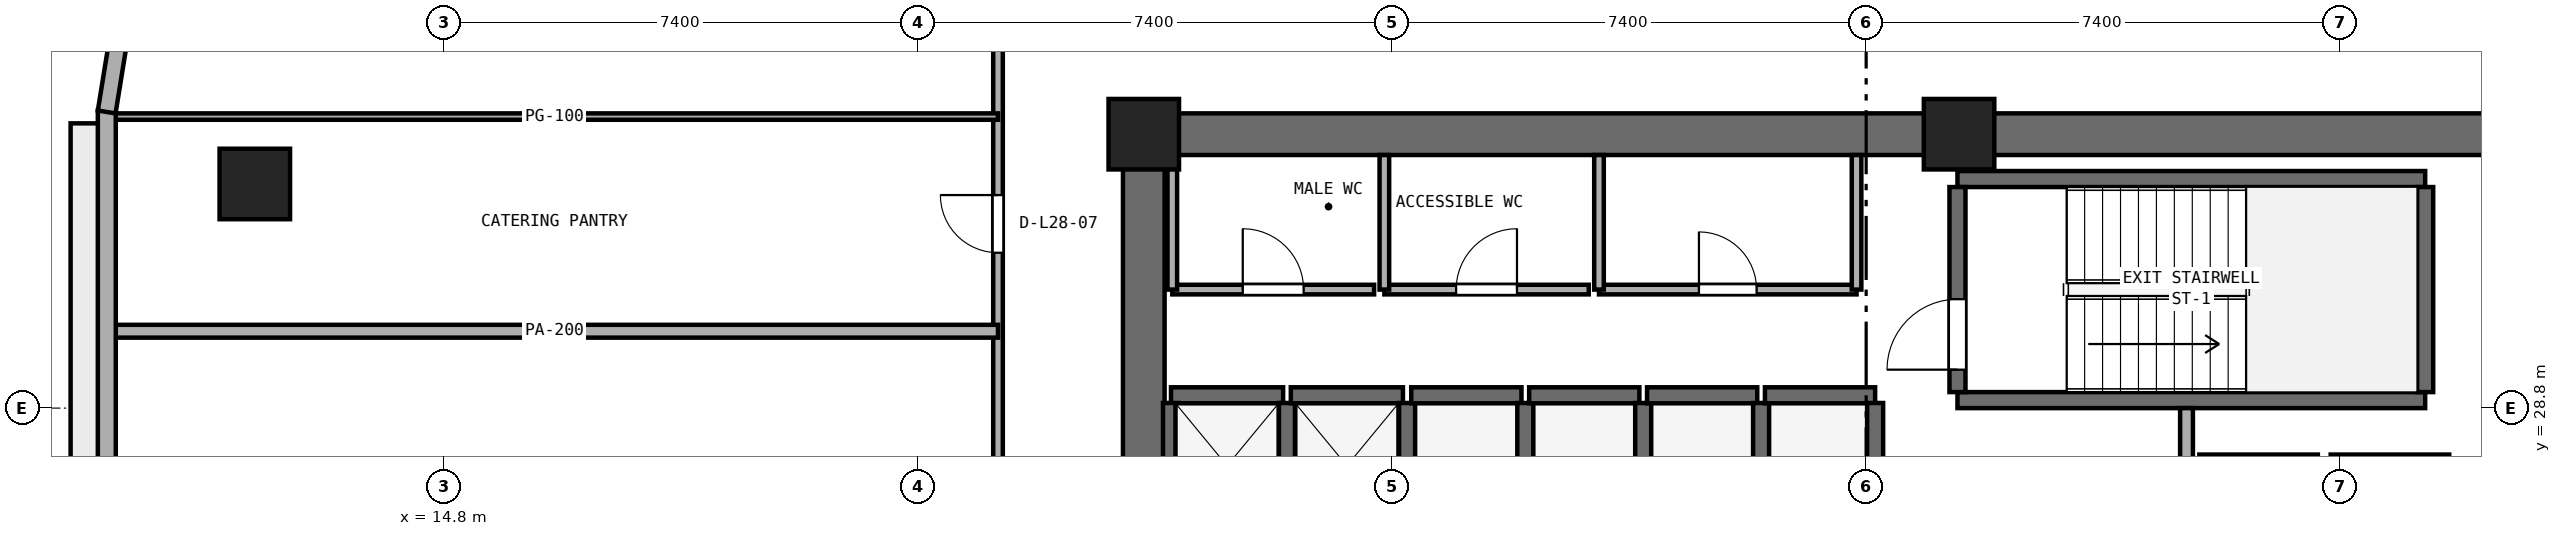
"""IFC4 building model, lengths in metres.
Left out: names, types, materials, properties, quantities, classifications, styles, units other than length and angle.
Written with IfcOpenShell. Run it as: python <this file> out.ifc"""

import sys

from ifc_helpers import new_model, si_unit, direction, frame, frame_2d, origin, origin_2d, place, context, subcontext, project, spatial, rectangle, extrude, element, fill, save


model = new_model("IFC4")
c1 = context("Model", 3, precision=1e-05, world=origin(), true_north=direction((0.0, 1.0)))
c2 = subcontext(c1, "Body", "Model", "MODEL_VIEW")
j1 = project(units=[si_unit("LENGTHUNIT", "METRE"), si_unit("PLANEANGLEUNIT", "RADIAN")], contexts=[c1])
p1 = place(None, origin())
s1 = spatial("IfcSite", under=j1, at=p1, CompositionType="ELEMENT")
p2 = place(p1, origin())
s2 = spatial("IfcBuilding", under=s1, at=p2, CompositionType="ELEMENT")
p3 = place(p2, frame((0.0, 0.0, 112.4)))
s3 = spatial("IfcBuildingStorey", under=s2, at=p3, CompositionType="ELEMENT", Elevation=112.4)
p4 = place(p3, frame((25.4, 33.075, 0.0), z_axis=(0.0, 0.0, 1.0), x_axis=(1.0, 0.0, 0.0)))
e1 = element("IfcWall", 1, at=p4, inside=s3, PredefinedType="SHEAR", context=c2, shape_type="SweptSolid", body=[
    extrude(rectangle(XDim=23.2, YDim=0.65, at=frame_2d((11.6, 0.0))), origin(), (0.0, 0.0, 1.0), 3.525),
])
p5 = place(p3, frame((25.725, 17.65, 0.0), z_axis=(0.0, 0.0, 1.0), x_axis=(0.0, 1.0, 0.0)))
e2 = element("IfcWall", 2, at=p5, inside=s3, PredefinedType="SHEAR", context=c2, shape_type="SweptSolid", body=[
    extrude(rectangle(XDim=15.1, YDim=0.65, at=frame_2d((7.55, 0.0))), origin(), (0.0, 0.0, 1.0), 3.525),
])
p6 = place(p5, frame((6.8, 0.0, 0.0)))
e3 = element("IfcOpeningElement", 3, at=p6, cuts=e2, PredefinedType="OPENING", context=c2, shape_type="SweptSolid", body=[
    extrude(rectangle(XDim=1.5, YDim=2.15, at=frame_2d((0.75, 1.075))), frame((0.0, 0.335, 0.0), z_axis=(0.0, -1.0, 0.0), x_axis=(1.0, 0.0, 0.0)), (0.0, 0.0, 1.0), 0.67),
])
for number, where, z_axis, x_axis in (
    (4, (38.45, 33.075, 0.0), (0.0, 0.0, 1.0), (1.0, 0.0, 0.0)),
    (5, (25.725, 33.075, 0.0), (0.0, 0.0, 1.0), (1.0, 0.0, 0.0)),
):
    element("IfcColumn", number, at=place(p3, frame(where, z_axis=z_axis, x_axis=x_axis)), inside=s3, PredefinedType="PILASTER", context=c2, shape_type="SweptSolid", body=[
        extrude(rectangle(XDim=1.1, YDim=1.1, at=origin_2d()), origin(), (0.0, 0.0, 1.0), 3.8),
    ])
p7 = place(p3, frame((11.85, 32.298, 0.0), z_axis=(0.0, 0.0, 1.0), x_axis=(1.0, 0.0, 0.0)))
e6 = element("IfcColumn", 6, at=p7, inside=s3, PredefinedType="COLUMN", context=c2, shape_type="SweptSolid", body=[
    extrude(rectangle(XDim=1.1, YDim=1.1, at=origin_2d()), origin(), (0.0, 0.0, 1.0), 3.8),
])
for number, where, z_axis, x_axis in (
    (7, (38.425, 28.925, 0.0), (0.0, 0.0, 1.0), (1.0, 0.0, 0.0)),
    (8, (38.425, 32.375, 0.0), (0.0, 0.0, 1.0), (1.0, 0.0, 0.0)),
):
    element("IfcWall", number, at=place(p3, frame(where, z_axis=z_axis, x_axis=x_axis)), inside=s3, PredefinedType="SHEAR", context=c2, shape_type="SweptSolid", body=[
        extrude(rectangle(XDim=7.3, YDim=0.25, at=frame_2d((3.65, 0.0))), origin(), (0.0, 0.0, 1.0), 3.525),
    ])
p8 = place(p3, frame((38.425, 29.05, 0.0), z_axis=(0.0, 0.0, 1.0), x_axis=(0.0, 1.0, 0.0)))
e9 = element("IfcWall", 9, at=p8, inside=s3, PredefinedType="SHEAR", context=c2, shape_type="SweptSolid", body=[
    extrude(rectangle(XDim=3.2, YDim=0.25, at=frame_2d((1.6, 0.0))), origin(), (0.0, 0.0, 1.0), 3.525),
])
p9 = place(p8, frame((0.35, 0.0, 0.0)))
e10 = element("IfcOpeningElement", 10, at=p9, cuts=e9, PredefinedType="OPENING", context=c2, shape_type="SweptSolid", body=[
    extrude(rectangle(XDim=1.1, YDim=2.15, at=frame_2d((0.55, 1.075))), frame((0.0, 0.135, 0.0), z_axis=(0.0, -1.0, 0.0), x_axis=(1.0, 0.0, 0.0)), (0.0, 0.0, 1.0), 0.27),
])
p10 = place(p3, frame((45.725, 29.05, 0.0), z_axis=(0.0, 0.0, 1.0), x_axis=(0.0, 1.0, 0.0)))
e11 = element("IfcWall", 11, at=p10, inside=s3, PredefinedType="SHEAR", context=c2, shape_type="SweptSolid", body=[
    extrude(rectangle(XDim=3.2, YDim=0.25, at=frame_2d((1.6, 0.0))), origin(), (0.0, 0.0, 1.0), 3.525),
])
p11 = place(p3, frame((26.15, 29.0, 0.0), z_axis=(0.0, 0.0, 1.0), x_axis=(1.0, 0.0, 0.0)))
e12 = element("IfcWall", 12, at=p11, inside=s3, PredefinedType="SHEAR", context=c2, shape_type="SweptSolid", body=[
    extrude(rectangle(XDim=1.75, YDim=0.25, at=frame_2d((0.875, 0.0))), origin(), (0.0, 0.0, 1.0), 3.525),
])
for number, where, z_axis, x_axis in (
    (13, (26.15, 26.92, 0.0), (0.0, 0.0, 1.0), (0.0, 1.0, 0.0)),
    (14, (27.96, 26.92, 0.0), (0.0, 0.0, 1.0), (0.0, 1.0, 0.0)),
):
    element("IfcWall", number, at=place(p3, frame(where, z_axis=z_axis, x_axis=x_axis)), inside=s3, PredefinedType="SHEAR", context=c2, shape_type="SweptSolid", body=[
        extrude(rectangle(XDim=1.96, YDim=0.25, at=frame_2d((0.98, 0.0))), origin(), (0.0, 0.0, 1.0), 3.525),
    ])
p12 = place(p3, frame((28.02, 29.0, 0.0), z_axis=(0.0, 0.0, 1.0), x_axis=(1.0, 0.0, 0.0)))
e15 = element("IfcWall", 15, at=p12, inside=s3, PredefinedType="SHEAR", context=c2, shape_type="SweptSolid", body=[
    extrude(rectangle(XDim=1.75, YDim=0.25, at=frame_2d((0.875, 0.0))), origin(), (0.0, 0.0, 1.0), 3.525),
])
p13 = place(p3, frame((29.835, 26.92, 0.0), z_axis=(0.0, 0.0, 1.0), x_axis=(0.0, 1.0, 0.0)))
e16 = element("IfcWall", 16, at=p13, inside=s3, PredefinedType="SHEAR", context=c2, shape_type="SweptSolid", body=[
    extrude(rectangle(XDim=1.96, YDim=0.25, at=frame_2d((0.98, 0.0))), origin(), (0.0, 0.0, 1.0), 3.525),
])
p14 = place(p3, frame((29.9, 29.0, 0.0), z_axis=(0.0, 0.0, 1.0), x_axis=(1.0, 0.0, 0.0)))
e17 = element("IfcWall", 17, at=p14, inside=s3, PredefinedType="SHEAR", context=c2, shape_type="SweptSolid", body=[
    extrude(rectangle(XDim=1.72, YDim=0.25, at=frame_2d((0.86, 0.0))), origin(), (0.0, 0.0, 1.0), 3.525),
])
p15 = place(p3, frame((31.68, 26.92, 0.0), z_axis=(0.0, 0.0, 1.0), x_axis=(0.0, 1.0, 0.0)))
e18 = element("IfcWall", 18, at=p15, inside=s3, PredefinedType="SHEAR", context=c2, shape_type="SweptSolid", body=[
    extrude(rectangle(XDim=1.96, YDim=0.25, at=frame_2d((0.98, 0.0))), origin(), (0.0, 0.0, 1.0), 3.525),
])
p16 = place(p3, frame((31.74, 29.0, 0.0), z_axis=(0.0, 0.0, 1.0), x_axis=(1.0, 0.0, 0.0)))
e19 = element("IfcWall", 19, at=p16, inside=s3, PredefinedType="SHEAR", context=c2, shape_type="SweptSolid", body=[
    extrude(rectangle(XDim=1.72, YDim=0.25, at=frame_2d((0.86, 0.0))), origin(), (0.0, 0.0, 1.0), 3.525),
])
p17 = place(p3, frame((33.52, 26.92, 0.0), z_axis=(0.0, 0.0, 1.0), x_axis=(0.0, 1.0, 0.0)))
e20 = element("IfcWall", 20, at=p17, inside=s3, PredefinedType="SHEAR", context=c2, shape_type="SweptSolid", body=[
    extrude(rectangle(XDim=1.96, YDim=0.25, at=frame_2d((0.98, 0.0))), origin(), (0.0, 0.0, 1.0), 3.525),
])
p18 = place(p3, frame((33.58, 29.0, 0.0), z_axis=(0.0, 0.0, 1.0), x_axis=(1.0, 0.0, 0.0)))
e21 = element("IfcWall", 21, at=p18, inside=s3, PredefinedType="SHEAR", context=c2, shape_type="SweptSolid", body=[
    extrude(rectangle(XDim=1.72, YDim=0.25, at=frame_2d((0.86, 0.0))), origin(), (0.0, 0.0, 1.0), 3.525),
])
p19 = place(p3, frame((35.36, 26.92, 0.0), z_axis=(0.0, 0.0, 1.0), x_axis=(0.0, 1.0, 0.0)))
e22 = element("IfcWall", 22, at=p19, inside=s3, PredefinedType="SHEAR", context=c2, shape_type="SweptSolid", body=[
    extrude(rectangle(XDim=1.96, YDim=0.25, at=frame_2d((0.98, 0.0))), origin(), (0.0, 0.0, 1.0), 3.525),
])
p20 = place(p3, frame((35.42, 29.0, 0.0), z_axis=(0.0, 0.0, 1.0), x_axis=(1.0, 0.0, 0.0)))
e23 = element("IfcWall", 23, at=p20, inside=s3, PredefinedType="SHEAR", context=c2, shape_type="SweptSolid", body=[
    extrude(rectangle(XDim=1.72, YDim=0.25, at=frame_2d((0.86, 0.0))), origin(), (0.0, 0.0, 1.0), 3.525),
])
p21 = place(p3, frame((37.14, 26.92, 0.0), z_axis=(0.0, 0.0, 1.0), x_axis=(0.0, 1.0, 0.0)))
e24 = element("IfcWall", 24, at=p21, inside=s3, PredefinedType="SHEAR", context=c2, shape_type="SweptSolid", body=[
    extrude(rectangle(XDim=1.96, YDim=0.25, at=frame_2d((0.98, 0.0))), origin(), (0.0, 0.0, 1.0), 3.525),
])
for number, where, z_axis, x_axis in (
    (25, (42.2, 27.95, 0.0), (0.0, 0.0, 1.0), (1.0, 0.0, 0.0)),
    (26, (44.25, 27.95, 0.0), (0.0, 0.0, 1.0), (1.0, 0.0, 0.0)),
):
    element("IfcWall", number, at=place(p3, frame(where, z_axis=z_axis, x_axis=x_axis)), inside=s3, PredefinedType="SHEAR", context=c2, shape_type="SweptSolid", body=[
        extrude(rectangle(XDim=1.85, YDim=0.25, at=frame_2d((0.925, 0.0))), origin(), (0.0, 0.0, 1.0), 3.525),
    ])
p22 = place(p3, frame((42.0, 22.75, 0.0), z_axis=(0.0, 0.0, 1.0), x_axis=(0.0, 1.0, 0.0)))
e27 = element("IfcWall", 27, at=p22, inside=s3, PredefinedType="SOLIDWALL", context=c2, shape_type="SweptSolid", body=[
    extrude(rectangle(XDim=6.05, YDim=0.2, at=frame_2d((3.025, 0.0))), origin(), (0.0, 0.0, 1.0), 3.525),
])
p23 = place(p22, frame((0.65, 0.0, 0.0)))
e28 = element("IfcOpeningElement", 28, at=p23, cuts=e27, PredefinedType="OPENING", context=c2, shape_type="SweptSolid", body=[
    extrude(rectangle(XDim=1.2, YDim=2.15, at=frame_2d((0.6, 1.075))), frame((0.0, 0.11, 0.0), z_axis=(0.0, -1.0, 0.0), x_axis=(1.0, 0.0, 0.0)), (0.0, 0.0, 1.0), 0.22),
])
p24 = place(p3, frame((26.17, 30.65, 0.0), z_axis=(0.0, 0.0, 1.0), x_axis=(1.0, 0.0, 0.0)))
e29 = element("IfcWall", 29, at=p24, inside=s3, PredefinedType="PARTITIONING", context=c2, shape_type="SweptSolid", body=[
    extrude(rectangle(XDim=3.15, YDim=0.15, at=frame_2d((1.575, 0.0))), origin(), (0.0, 0.0, 1.0), 3.525),
])
p25 = place(p24, frame((1.1, 0.0, 0.0)))
e30 = element("IfcOpeningElement", 30, at=p25, cuts=e29, PredefinedType="OPENING", context=c2, shape_type="SweptSolid", body=[
    extrude(rectangle(XDim=0.95, YDim=2.1, at=frame_2d((0.475, 1.05))), frame((0.0, 0.085, 0.0), z_axis=(0.0, -1.0, 0.0), x_axis=(1.0, 0.0, 0.0)), (0.0, 0.0, 1.0), 0.17),
])
p26 = place(p3, frame((26.17, 30.65, 0.0), z_axis=(0.0, 0.0, 1.0), x_axis=(0.0, 1.0, 0.0)))
e31 = element("IfcWall", 31, at=p26, inside=s3, PredefinedType="PARTITIONING", context=c2, shape_type="SweptSolid", body=[
    extrude(rectangle(XDim=2.1, YDim=0.15, at=frame_2d((1.05, 0.0))), origin(), (0.0, 0.0, 1.0), 3.525),
])
p27 = place(p3, frame((29.48, 30.65, 0.0), z_axis=(0.0, 0.0, 1.0), x_axis=(1.0, 0.0, 0.0)))
e32 = element("IfcWall", 32, at=p27, inside=s3, PredefinedType="PARTITIONING", context=c2, shape_type="SweptSolid", body=[
    extrude(rectangle(XDim=3.19, YDim=0.15, at=frame_2d((1.595, 0.0))), origin(), (0.0, 0.0, 1.0), 3.525),
])
p28 = place(p27, frame((1.12, 0.0, 0.0)))
e33 = element("IfcOpeningElement", 33, at=p28, cuts=e32, PredefinedType="OPENING", context=c2, shape_type="SweptSolid", body=[
    extrude(rectangle(XDim=0.95, YDim=2.1, at=frame_2d((0.475, 1.05))), frame((0.0, 0.085, 0.0), z_axis=(0.0, -1.0, 0.0), x_axis=(1.0, 0.0, 0.0)), (0.0, 0.0, 1.0), 0.17),
])
p29 = place(p3, frame((29.48, 30.65, 0.0), z_axis=(0.0, 0.0, 1.0), x_axis=(0.0, 1.0, 0.0)))
e34 = element("IfcWall", 34, at=p29, inside=s3, PredefinedType="PARTITIONING", context=c2, shape_type="SweptSolid", body=[
    extrude(rectangle(XDim=2.1, YDim=0.15, at=frame_2d((1.05, 0.0))), origin(), (0.0, 0.0, 1.0), 3.525),
])
p30 = place(p3, frame((32.83, 30.65, 0.0), z_axis=(0.0, 0.0, 1.0), x_axis=(1.0, 0.0, 0.0)))
e35 = element("IfcWall", 35, at=p30, inside=s3, PredefinedType="PARTITIONING", context=c2, shape_type="SweptSolid", body=[
    extrude(rectangle(XDim=4.02, YDim=0.15, at=frame_2d((2.01, 0.0))), origin(), (0.0, 0.0, 1.0), 3.525),
])
p31 = place(p30, frame((1.56, 0.0, 0.0)))
e36 = element("IfcOpeningElement", 36, at=p31, cuts=e35, PredefinedType="OPENING", context=c2, shape_type="SweptSolid", body=[
    extrude(rectangle(XDim=0.9, YDim=2.1, at=frame_2d((0.45, 1.05))), frame((0.0, 0.085, 0.0), z_axis=(0.0, -1.0, 0.0), x_axis=(1.0, 0.0, 0.0)), (0.0, 0.0, 1.0), 0.17),
])
for number, where, z_axis, x_axis in (
    (37, (32.83, 30.65, 0.0), (0.0, 0.0, 1.0), (0.0, 1.0, 0.0)),
    (38, (36.85, 30.65, 0.0), (0.0, 0.0, 1.0), (0.0, 1.0, 0.0)),
):
    element("IfcWall", number, at=place(p3, frame(where, z_axis=z_axis, x_axis=x_axis)), inside=s3, PredefinedType="PARTITIONING", context=c2, shape_type="SweptSolid", body=[
        extrude(rectangle(XDim=2.1, YDim=0.15, at=frame_2d((1.05, 0.0))), origin(), (0.0, 0.0, 1.0), 3.525),
    ])
p32 = place(p3, frame((23.45, 15.05, 0.0), z_axis=(0.0, 0.0, 1.0), x_axis=(0.0, 1.0, 0.0)))
e39 = element("IfcWall", 39, at=p32, inside=s3, PredefinedType="PARTITIONING", context=c2, shape_type="SweptSolid", body=[
    extrude(rectangle(XDim=20.3, YDim=0.15, at=frame_2d((10.15, 0.0))), origin(), (0.0, 0.0, 1.0), 3.525),
])
p33 = place(p32, frame((8.025, 0.0, 0.0)))
e40 = element("IfcOpeningElement", 40, at=p33, cuts=e39, PredefinedType="OPENING", context=c2, shape_type="SweptSolid", body=[
    extrude(rectangle(XDim=0.9, YDim=2.1, at=frame_2d((0.45, 1.05))), frame((0.0, 0.085, 0.0), z_axis=(0.0, -1.0, 0.0), x_axis=(1.0, 0.0, 0.0)), (0.0, 0.0, 1.0), 0.17),
])
p34 = place(p32, frame((16.175, 0.0, 0.0)))
e41 = element("IfcOpeningElement", 41, at=p34, cuts=e39, PredefinedType="OPENING", context=c2, shape_type="SweptSolid", body=[
    extrude(rectangle(XDim=0.9, YDim=2.1, at=frame_2d((0.45, 1.05))), frame((0.0, 0.085, 0.0), z_axis=(0.0, -1.0, 0.0), x_axis=(1.0, 0.0, 0.0)), (0.0, 0.0, 1.0), 0.17),
])
p35 = place(p3, frame((9.605, 30.0, 0.0), z_axis=(0.0, 0.0, 1.0), x_axis=(1.0, 0.0, 0.0)))
e42 = element("IfcWall", 42, at=p35, inside=s3, PredefinedType="PARTITIONING", context=c2, shape_type="SweptSolid", body=[
    extrude(rectangle(XDim=13.845, YDim=0.2, at=frame_2d((6.922, 0.0))), origin(), (0.0, 0.0, 1.0), 3.525),
])
p36 = place(p3, frame((9.605, 33.35, 0.0), z_axis=(0.0, 0.0, 1.0), x_axis=(1.0, 0.0, 0.0)))
e43 = element("IfcWall", 43, at=p36, inside=s3, PredefinedType="PARTITIONING", context=c2, shape_type="SweptSolid", body=[
    extrude(rectangle(XDim=13.845, YDim=0.1, at=frame_2d((6.922, 0.0))), origin(), (0.0, 0.0, 1.0), 3.525),
])
p37 = place(p3, frame((9.54, 33.444, 0.0), z_axis=(0.0, 0.0, 1.0), x_axis=(0.0, -1.0, 0.0)))
e44 = element("IfcWall", 44, at=p37, inside=s3, PredefinedType="STANDARD", context=c2, shape_type="SweptSolid", body=[
    extrude(rectangle(XDim=17.301, YDim=0.28, at=frame_2d((8.65, 0.0))), origin(), (0.0, 0.0, 1.0), 3.525),
])
p38 = place(p37, frame((7.3, 0.0, 0.9)))
e45 = element("IfcOpeningElement", 45, at=p38, cuts=e44, PredefinedType="OPENING", context=c2, shape_type="SweptSolid", body=[
    extrude(rectangle(XDim=2.7, YDim=1.75, at=frame_2d((1.35, 0.875))), frame((0.0, 0.15, 0.0), z_axis=(0.0, -1.0, 0.0), x_axis=(1.0, 0.0, 0.0)), (0.0, 0.0, 1.0), 0.3),
])
p39 = place(p37, frame((12.734, 0.0, 0.9)))
e46 = element("IfcOpeningElement", 46, at=p39, cuts=e44, PredefinedType="OPENING", context=c2, shape_type="SweptSolid", body=[
    extrude(rectangle(XDim=2.7, YDim=1.75, at=frame_2d((1.35, 0.875))), frame((0.0, 0.15, 0.0), z_axis=(0.0, -1.0, 0.0), x_axis=(1.0, 0.0, 0.0)), (0.0, 0.0, 1.0), 0.3),
])
p40 = place(p3, frame((9.753, 34.749, 0.0), z_axis=(0.0, 0.0, 1.0), x_axis=(-0.160037671962, -0.987110907423, 0.0)))
e47 = element("IfcWall", 47, at=p40, inside=s3, PredefinedType="STANDARD", context=c2, shape_type="SweptSolid", body=[
    extrude(rectangle(XDim=1.344, YDim=0.28, at=frame_2d((0.672, 0.0))), origin(), (0.0, 0.0, 1.0), 3.525),
])
p41 = place(p9, origin())
e48 = element("IfcDoor", 48, at=p41, inside=s3, OperationType="SINGLE_SWING_LEFT", PredefinedType="DOOR", context=c2, shape_type="SweptSolid", body=[
    extrude(rectangle(XDim=1.1, YDim=2.15, at=frame_2d((0.55, 1.075))), frame((0.0, 0.025, 0.0), z_axis=(0.0, -1.0, 0.0), x_axis=(1.0, 0.0, 0.0)), (0.0, 0.0, 1.0), 0.05),
])
fill(e10, e48)
p42 = place(p25, origin())
e49 = element("IfcDoor", 49, at=p42, inside=s3, OperationType="SINGLE_SWING_LEFT", PredefinedType="DOOR", context=c2, shape_type="SweptSolid", body=[
    extrude(rectangle(XDim=0.95, YDim=2.1, at=frame_2d((0.475, 1.05))), frame((0.0, 0.025, 0.0), z_axis=(0.0, -1.0, 0.0), x_axis=(1.0, 0.0, 0.0)), (0.0, 0.0, 1.0), 0.05),
])
fill(e30, e49)
p43 = place(p28, origin())
e50 = element("IfcDoor", 50, at=p43, inside=s3, OperationType="SINGLE_SWING_RIGHT", PredefinedType="DOOR", context=c2, shape_type="SweptSolid", body=[
    extrude(rectangle(XDim=0.95, YDim=2.1, at=frame_2d((0.475, 1.05))), frame((0.0, 0.025, 0.0), z_axis=(0.0, -1.0, 0.0), x_axis=(1.0, 0.0, 0.0)), (0.0, 0.0, 1.0), 0.05),
])
fill(e33, e50)
p44 = place(p31, origin())
e51 = element("IfcDoor", 51, at=p44, inside=s3, OperationType="SINGLE_SWING_LEFT", PredefinedType="DOOR", context=c2, shape_type="SweptSolid", body=[
    extrude(rectangle(XDim=0.9, YDim=2.1, at=frame_2d((0.45, 1.05))), frame((0.0, 0.025, 0.0), z_axis=(0.0, -1.0, 0.0), x_axis=(1.0, 0.0, 0.0)), (0.0, 0.0, 1.0), 0.05),
])
fill(e36, e51)
p45 = place(p34, origin())
e52 = element("IfcDoor", 52, at=p45, inside=s3, OperationType="SINGLE_SWING_RIGHT", PredefinedType="DOOR", context=c2, shape_type="SweptSolid", body=[
    extrude(rectangle(XDim=0.9, YDim=2.1, at=frame_2d((0.45, 1.05))), frame((0.0, 0.025, 0.0), z_axis=(0.0, -1.0, 0.0), x_axis=(1.0, 0.0, 0.0)), (0.0, 0.0, 1.0), 0.05),
])
fill(e41, e52)
save(model, sys.argv[1])
